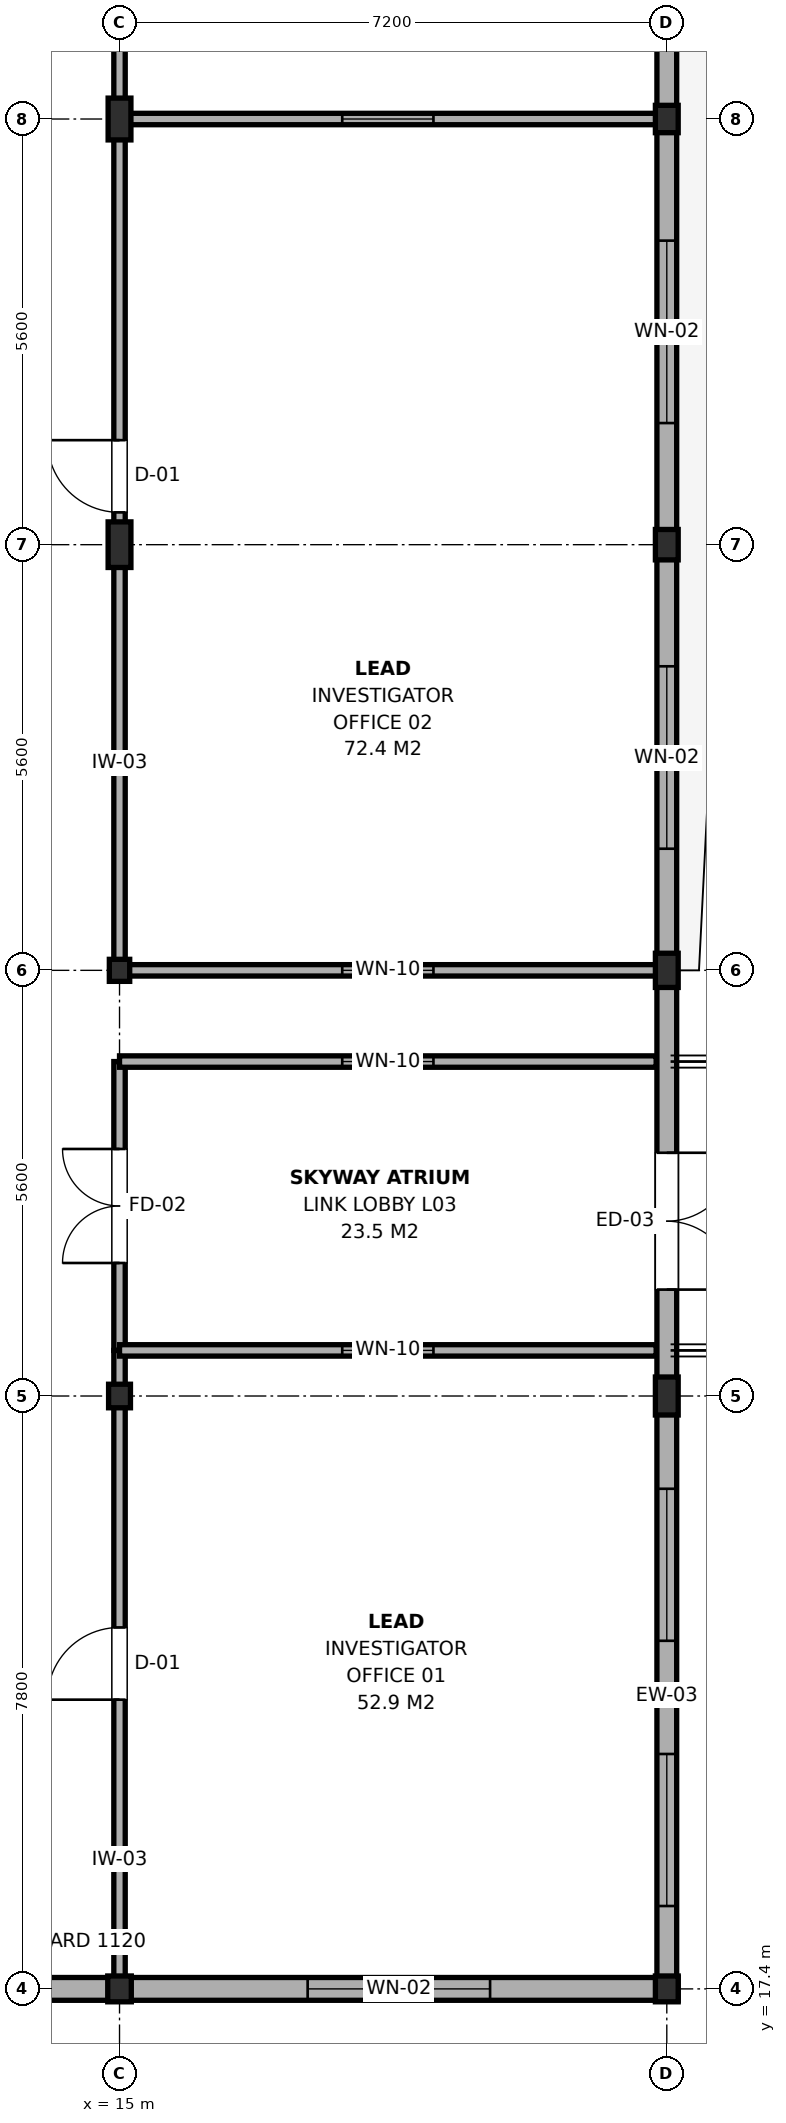
"""IFC4 building model, lengths in metres.
Left out: names, types, materials, properties, quantities, classifications, styles, units other than length and angle.
Written with IfcOpenShell. Run it as: python <this file> out.ifc"""

import sys

from ifc_helpers import new_model, si_unit, direction, frame, frame_2d, origin, origin_2d, place, context, subcontext, project, spatial, rectangle, i_section, extrude, element, fill, save


model = new_model("IFC4")
c1 = context("Model", 3, precision=1e-05, world=origin(), true_north=direction((0.0, 1.0)))
c2 = subcontext(c1, "Body", "Model", "MODEL_VIEW")
j1 = project(units=[si_unit("LENGTHUNIT", "METRE"), si_unit("PLANEANGLEUNIT", "RADIAN")], contexts=[c1])
p1 = place(None, origin())
s1 = spatial("IfcSite", under=j1, at=p1, CompositionType="ELEMENT")
p2 = place(p1, origin())
s2 = spatial("IfcBuilding", under=s1, at=p2, CompositionType="ELEMENT")
p3 = place(p2, frame((0.0, 0.0, 13.2)))
s3 = spatial("IfcBuildingStorey", under=s2, at=p3, CompositionType="ELEMENT", Elevation=13.2)
p4 = place(p3, frame((15.0, 17.4, 0.0), z_axis=(0.0, 0.0, 1.0), x_axis=(1.0, 0.0, 0.0)))
e1 = element("IfcColumn", 1, at=p4, inside=s3, PredefinedType="COLUMN", context=c2, shape_type="SweptSolid", body=[
    extrude(i_section(OverallWidth=0.31, OverallDepth=0.34, WebThickness=0.021, FlangeThickness=0.039, FilletRadius=0.027, at=origin_2d()), origin(), (0.0, 0.0, 1.0), 3.9),
])
p5 = place(p3, frame((15.0, 25.2, 0.0), z_axis=(0.0, 0.0, 1.0), x_axis=(1.0, 0.0, 0.0)))
e2 = element("IfcColumn", 2, at=p5, inside=s3, PredefinedType="COLUMN", context=c2, shape_type="SweptSolid", body=[
    extrude(i_section(OverallWidth=0.288, OverallDepth=0.31, WebThickness=0.019, FlangeThickness=0.033, FilletRadius=0.024, at=origin_2d()), origin(), (0.0, 0.0, 1.0), 3.9),
])
p6 = place(p3, frame((15.0, 30.8, 0.0), z_axis=(0.0, 0.0, 1.0), x_axis=(1.0, 0.0, 0.0)))
e3 = element("IfcColumn", 3, at=p6, inside=s3, PredefinedType="COLUMN", context=c2, shape_type="SweptSolid", body=[
    extrude(i_section(OverallWidth=0.268, OverallDepth=0.29, WebThickness=0.018, FlangeThickness=0.032, FilletRadius=0.024, at=origin_2d()), origin(), (0.0, 0.0, 1.0), 3.9),
])
p7 = place(p3, frame((15.0, 36.4, 0.0), z_axis=(0.0, 0.0, 1.0), x_axis=(1.0, 0.0, 0.0)))
e4 = element("IfcColumn", 4, at=p7, inside=s3, PredefinedType="COLUMN", context=c2, shape_type="SweptSolid", body=[
    extrude(i_section(OverallWidth=0.3, OverallDepth=0.6, WebThickness=0.015, FlangeThickness=0.03, FilletRadius=0.027, at=origin_2d()), origin(), (0.0, 0.0, 1.0), 3.9),
])
p8 = place(p3, frame((15.0, 42.0, 0.0), z_axis=(0.0, 0.0, 1.0), x_axis=(1.0, 0.0, 0.0)))
e5 = element("IfcColumn", 5, at=p8, inside=s3, PredefinedType="COLUMN", context=c2, shape_type="SweptSolid", body=[
    extrude(i_section(OverallWidth=0.3, OverallDepth=0.55, WebThickness=0.015, FlangeThickness=0.029, FilletRadius=0.027, at=origin_2d()), origin(), (0.0, 0.0, 1.0), 3.9),
])
p9 = place(p3, frame((22.2, 17.4, 0.0), z_axis=(0.0, 0.0, 1.0), x_axis=(1.0, 0.0, 0.0)))
e6 = element("IfcColumn", 6, at=p9, inside=s3, PredefinedType="COLUMN", context=c2, shape_type="SweptSolid", body=[
    extrude(i_section(OverallWidth=0.3, OverallDepth=0.34, WebThickness=0.012, FlangeThickness=0.021, FilletRadius=0.027, at=origin_2d()), origin(), (0.0, 0.0, 1.0), 3.9),
])
p10 = place(p3, frame((22.2, 25.2, 0.0), z_axis=(0.0, 0.0, 1.0), x_axis=(1.0, 0.0, 0.0)))
e7 = element("IfcColumn", 7, at=p10, inside=s3, PredefinedType="COLUMN", context=c2, shape_type="SweptSolid", body=[
    extrude(i_section(OverallWidth=0.3, OverallDepth=0.5, WebThickness=0.014, FlangeThickness=0.028, FilletRadius=0.027, at=origin_2d()), origin(), (0.0, 0.0, 1.0), 3.9),
])
p11 = place(p3, frame((22.2, 30.8, 0.0), z_axis=(0.0, 0.0, 1.0), x_axis=(1.0, 0.0, 0.0)))
e8 = element("IfcColumn", 8, at=p11, inside=s3, PredefinedType="COLUMN", context=c2, shape_type="SweptSolid", body=[
    extrude(i_section(OverallWidth=0.3, OverallDepth=0.45, WebThickness=0.014, FlangeThickness=0.026, FilletRadius=0.027, at=origin_2d()), origin(), (0.0, 0.0, 1.0), 3.9),
])
p12 = place(p3, frame((22.2, 36.4, 0.0), z_axis=(0.0, 0.0, 1.0), x_axis=(1.0, 0.0, 0.0)))
e9 = element("IfcColumn", 9, at=p12, inside=s3, PredefinedType="COLUMN", context=c2, shape_type="SweptSolid", body=[
    extrude(i_section(OverallWidth=0.3, OverallDepth=0.4, WebThickness=0.013, FlangeThickness=0.024, FilletRadius=0.027, at=origin_2d()), origin(), (0.0, 0.0, 1.0), 3.9),
])
p13 = place(p3, frame((22.2, 42.0, 0.0), z_axis=(0.0, 0.0, 1.0), x_axis=(1.0, 0.0, 0.0)))
e10 = element("IfcColumn", 10, at=p13, inside=s3, PredefinedType="COLUMN", context=c2, shape_type="SweptSolid", body=[
    extrude(i_section(OverallWidth=0.3, OverallDepth=0.36, WebThickness=0.012, FlangeThickness=0.022, FilletRadius=0.027, at=origin_2d()), origin(), (0.0, 0.0, 1.0), 3.9),
])
p14 = place(p3, frame((22.2, 17.27, 0.0), z_axis=(0.0, 0.0, 1.0), x_axis=(0.0, 1.0, 0.0)))
e11 = element("IfcWall", 11, at=p14, inside=s3, PredefinedType="SOLIDWALL", context=c2, shape_type="SweptSolid", body=[
    extrude(rectangle(XDim=7.93, YDim=0.26, at=frame_2d((3.965, 0.0))), origin(), (0.0, 0.0, 1.0), 3.145),
])
p15 = place(p14, frame((1.22, 0.0, 0.65)))
e12 = element("IfcOpeningElement", 12, at=p15, cuts=e11, PredefinedType="OPENING", context=c2, shape_type="SweptSolid", body=[
    extrude(rectangle(XDim=2.0, YDim=1.8, at=frame_2d((1.0, 0.9))), frame((0.0, 0.145, 0.0), z_axis=(0.0, -1.0, 0.0), x_axis=(1.0, 0.0, 0.0)), (0.0, 0.0, 1.0), 0.29),
])
p16 = place(p14, frame((4.71, 0.0, 0.65)))
e13 = element("IfcOpeningElement", 13, at=p16, cuts=e11, PredefinedType="OPENING", context=c2, shape_type="SweptSolid", body=[
    extrude(rectangle(XDim=2.0, YDim=1.8, at=frame_2d((1.0, 0.9))), frame((0.0, 0.145, 0.0), z_axis=(0.0, -1.0, 0.0), x_axis=(1.0, 0.0, 0.0)), (0.0, 0.0, 1.0), 0.29),
])
p17 = place(p3, frame((22.2, 25.2, 0.0), z_axis=(0.0, 0.0, 1.0), x_axis=(0.0, 1.0, 0.0)))
e14 = element("IfcWall", 14, at=p17, inside=s3, PredefinedType="SOLIDWALL", context=c2, shape_type="SweptSolid", body=[
    extrude(rectangle(XDim=5.6, YDim=0.26, at=frame_2d((2.8, 0.0))), origin(), (0.0, 0.0, 1.0), 3.145),
])
p18 = place(p17, frame((1.4, 0.0, 0.0)))
e15 = element("IfcOpeningElement", 15, at=p18, cuts=e14, PredefinedType="OPENING", context=c2, shape_type="SweptSolid", body=[
    extrude(rectangle(XDim=1.8, YDim=2.2, at=frame_2d((0.9, 1.1))), frame((0.0, 0.145, 0.0), z_axis=(0.0, -1.0, 0.0), x_axis=(1.0, 0.0, 0.0)), (0.0, 0.0, 1.0), 0.29),
])
p19 = place(p3, frame((22.2, 30.8, 0.0), z_axis=(0.0, 0.0, 1.0), x_axis=(0.0, 1.0, 0.0)))
e16 = element("IfcWall", 16, at=p19, inside=s3, PredefinedType="SOLIDWALL", context=c2, shape_type="SweptSolid", body=[
    extrude(rectangle(XDim=5.6, YDim=0.26, at=frame_2d((2.8, 0.0))), origin(), (0.0, 0.0, 1.0), 3.195),
])
p20 = place(p19, frame((1.6, 0.0, 0.9)))
e17 = element("IfcOpeningElement", 17, at=p20, cuts=e16, PredefinedType="OPENING", context=c2, shape_type="SweptSolid", body=[
    extrude(rectangle(XDim=2.4, YDim=2.1, at=frame_2d((1.2, 1.05))), frame((0.0, 0.145, 0.0), z_axis=(0.0, -1.0, 0.0), x_axis=(1.0, 0.0, 0.0)), (0.0, 0.0, 1.0), 0.29),
])
p21 = place(p3, frame((22.2, 36.4, 0.0), z_axis=(0.0, 0.0, 1.0), x_axis=(0.0, 1.0, 0.0)))
e18 = element("IfcWall", 18, at=p21, inside=s3, PredefinedType="SOLIDWALL", context=c2, shape_type="SweptSolid", body=[
    extrude(rectangle(XDim=5.6, YDim=0.26, at=frame_2d((2.8, 0.0))), origin(), (0.0, 0.0, 1.0), 3.245),
])
p22 = place(p21, frame((1.6, 0.0, 0.9)))
e19 = element("IfcOpeningElement", 19, at=p22, cuts=e18, PredefinedType="OPENING", context=c2, shape_type="SweptSolid", body=[
    extrude(rectangle(XDim=2.4, YDim=2.1, at=frame_2d((1.2, 1.05))), frame((0.0, 0.145, 0.0), z_axis=(0.0, -1.0, 0.0), x_axis=(1.0, 0.0, 0.0)), (0.0, 0.0, 1.0), 0.29),
])
p23 = place(p3, frame((22.2, 42.0, 0.0), z_axis=(0.0, 0.0, 1.0), x_axis=(0.0, 1.0, 0.0)))
e20 = element("IfcWall", 20, at=p23, inside=s3, PredefinedType="SOLIDWALL", context=c2, shape_type="SweptSolid", body=[
    extrude(rectangle(XDim=5.6, YDim=0.26, at=frame_2d((2.8, 0.0))), origin(), (0.0, 0.0, 1.0), 3.095),
])
p24 = place(p23, frame((1.9, 0.0, 0.65)))
e21 = element("IfcOpeningElement", 21, at=p24, cuts=e20, PredefinedType="OPENING", context=c2, shape_type="SweptSolid", body=[
    extrude(rectangle(XDim=1.8, YDim=1.2, at=frame_2d((0.9, 0.6))), frame((0.0, 0.145, 0.0), z_axis=(0.0, -1.0, 0.0), x_axis=(1.0, 0.0, 0.0)), (0.0, 0.0, 1.0), 0.29),
])
p25 = place(p3, frame((7.8, 17.4, 0.0), z_axis=(0.0, 0.0, 1.0), x_axis=(1.0, 0.0, 0.0)))
e22 = element("IfcWall", 22, at=p25, inside=s3, PredefinedType="SOLIDWALL", context=c2, shape_type="SweptSolid", body=[
    extrude(rectangle(XDim=7.2, YDim=0.3, at=frame_2d((3.6, 0.0))), origin(), (0.0, 0.0, 1.0), 3.245),
])
p26 = place(p25, frame((1.45, 0.0, 0.9)))
e23 = element("IfcOpeningElement", 23, at=p26, cuts=e22, PredefinedType="OPENING", context=c2, shape_type="SweptSolid", body=[
    extrude(rectangle(XDim=2.4, YDim=2.1, at=frame_2d((1.2, 1.05))), frame((0.0, 0.165, 0.0), z_axis=(0.0, -1.0, 0.0), x_axis=(1.0, 0.0, 0.0)), (0.0, 0.0, 1.0), 0.33),
])
p27 = place(p3, frame((15.0, 17.4, 0.0), z_axis=(0.0, 0.0, 1.0), x_axis=(1.0, 0.0, 0.0)))
e24 = element("IfcWall", 24, at=p27, inside=s3, PredefinedType="SOLIDWALL", context=c2, shape_type="SweptSolid", body=[
    extrude(rectangle(XDim=7.35, YDim=0.3, at=frame_2d((3.675, 0.0))), origin(), (0.0, 0.0, 1.0), 3.345),
])
p28 = place(p27, frame((2.475, 0.0, 0.9)))
e25 = element("IfcOpeningElement", 25, at=p28, cuts=e24, PredefinedType="OPENING", context=c2, shape_type="SweptSolid", body=[
    extrude(rectangle(XDim=2.4, YDim=2.1, at=frame_2d((1.2, 1.05))), frame((0.0, 0.165, 0.0), z_axis=(0.0, -1.0, 0.0), x_axis=(1.0, 0.0, 0.0)), (0.0, 0.0, 1.0), 0.33),
])
p29 = place(p3, frame((15.0, 17.56, 0.0), z_axis=(0.0, 0.0, 1.0), x_axis=(0.0, 1.0, 0.0)))
e26 = element("IfcWall", 26, at=p29, inside=s3, PredefinedType="PARTITIONING", context=c2, shape_type="SweptSolid", body=[
    extrude(rectangle(XDim=8.24, YDim=0.15, at=frame_2d((4.12, 0.0))), origin(), (0.0, 0.0, 1.0), 3.145),
])
p30 = place(p29, frame((3.645, 0.0, 0.0)))
e27 = element("IfcOpeningElement", 27, at=p30, cuts=e26, PredefinedType="OPENING", context=c2, shape_type="SweptSolid", body=[
    extrude(rectangle(XDim=0.95, YDim=2.15, at=frame_2d((0.475, 1.075))), frame((0.0, 0.09, 0.0), z_axis=(0.0, -1.0, 0.0), x_axis=(1.0, 0.0, 0.0)), (0.0, 0.0, 1.0), 0.18),
])
p31 = place(p3, frame((15.0, 25.8, 0.0), z_axis=(0.0, 0.0, 1.0), x_axis=(0.0, 1.0, 0.0)))
e28 = element("IfcWall", 28, at=p31, inside=s3, PredefinedType="PARTITIONING", context=c2, shape_type="SweptSolid", body=[
    extrude(rectangle(XDim=3.8, YDim=0.15, at=frame_2d((1.9, 0.0))), origin(), (0.0, 0.0, 1.0), 3.345),
])
p32 = place(p31, frame((1.15, 0.0, 0.0)))
e29 = element("IfcOpeningElement", 29, at=p32, cuts=e28, PredefinedType="OPENING", context=c2, shape_type="SweptSolid", body=[
    extrude(rectangle(XDim=1.5, YDim=2.15, at=frame_2d((0.75, 1.075))), frame((0.0, 0.09, 0.0), z_axis=(0.0, -1.0, 0.0), x_axis=(1.0, 0.0, 0.0)), (0.0, 0.0, 1.0), 0.18),
])
p33 = place(p3, frame((15.0, 25.8, 0.0), z_axis=(0.0, 0.0, 1.0), x_axis=(1.0, 0.0, 0.0)))
e30 = element("IfcWall", 30, at=p33, inside=s3, PredefinedType="PARTITIONING", context=c2, shape_type="SweptSolid", body=[
    extrude(rectangle(XDim=7.06, YDim=0.15, at=frame_2d((3.53, 0.0))), origin(), (0.0, 0.0, 1.0), 3.195),
])
p34 = place(p33, frame((2.93, 0.0, 0.95)))
e31 = element("IfcOpeningElement", 31, at=p34, cuts=e30, PredefinedType="OPENING", context=c2, shape_type="SweptSolid", body=[
    extrude(rectangle(XDim=1.2, YDim=1.5, at=frame_2d((0.6, 0.75))), frame((0.0, 0.09, 0.0), z_axis=(0.0, -1.0, 0.0), x_axis=(1.0, 0.0, 0.0)), (0.0, 0.0, 1.0), 0.18),
])
p35 = place(p3, frame((15.0, 29.6, 0.0), z_axis=(0.0, 0.0, 1.0), x_axis=(1.0, 0.0, 0.0)))
e32 = element("IfcWall", 32, at=p35, inside=s3, PredefinedType="PARTITIONING", context=c2, shape_type="SweptSolid", body=[
    extrude(rectangle(XDim=7.06, YDim=0.15, at=frame_2d((3.53, 0.0))), origin(), (0.0, 0.0, 1.0), 3.195),
])
p36 = place(p35, frame((2.93, 0.0, 0.95)))
e33 = element("IfcOpeningElement", 33, at=p36, cuts=e32, PredefinedType="OPENING", context=c2, shape_type="SweptSolid", body=[
    extrude(rectangle(XDim=1.2, YDim=1.5, at=frame_2d((0.6, 0.75))), frame((0.0, 0.09, 0.0), z_axis=(0.0, -1.0, 0.0), x_axis=(1.0, 0.0, 0.0)), (0.0, 0.0, 1.0), 0.18),
])
p37 = place(p3, frame((15.0, 30.8, 0.0), z_axis=(0.0, 0.0, 1.0), x_axis=(0.0, 1.0, 0.0)))
e34 = element("IfcWall", 34, at=p37, inside=s3, PredefinedType="PARTITIONING", context=c2, shape_type="SweptSolid", body=[
    extrude(rectangle(XDim=11.2, YDim=0.15, at=frame_2d((5.6, 0.0))), origin(), (0.0, 0.0, 1.0), 3.095),
])
p38 = place(p37, frame((6.025, 0.0, 0.0)))
e35 = element("IfcOpeningElement", 35, at=p38, cuts=e34, PredefinedType="OPENING", context=c2, shape_type="SweptSolid", body=[
    extrude(rectangle(XDim=0.95, YDim=2.15, at=frame_2d((0.475, 1.075))), frame((0.0, 0.09, 0.0), z_axis=(0.0, -1.0, 0.0), x_axis=(1.0, 0.0, 0.0)), (0.0, 0.0, 1.0), 0.18),
])
p39 = place(p3, frame((15.0, 30.8, 0.0), z_axis=(0.0, 0.0, 1.0), x_axis=(1.0, 0.0, 0.0)))
e36 = element("IfcWall", 36, at=p39, inside=s3, PredefinedType="PARTITIONING", context=c2, shape_type="SweptSolid", body=[
    extrude(rectangle(XDim=7.06, YDim=0.15, at=frame_2d((3.53, 0.0))), origin(), (0.0, 0.0, 1.0), 3.195),
])
p40 = place(p39, frame((2.93, 0.0, 0.95)))
e37 = element("IfcOpeningElement", 37, at=p40, cuts=e36, PredefinedType="OPENING", context=c2, shape_type="SweptSolid", body=[
    extrude(rectangle(XDim=1.2, YDim=1.5, at=frame_2d((0.6, 0.75))), frame((0.0, 0.09, 0.0), z_axis=(0.0, -1.0, 0.0), x_axis=(1.0, 0.0, 0.0)), (0.0, 0.0, 1.0), 0.18),
])
p41 = place(p3, frame((15.0, 42.0, 0.0), z_axis=(0.0, 0.0, 1.0), x_axis=(0.0, 1.0, 0.0)))
e38 = element("IfcWall", 38, at=p41, inside=s3, PredefinedType="PARTITIONING", context=c2, shape_type="SweptSolid", body=[
    extrude(rectangle(XDim=24.6, YDim=0.15, at=frame_2d((12.3, 0.0))), origin(), (0.0, 0.0, 1.0), 3.095),
])
p42 = place(p41, frame((11.5, 0.0, 0.0)))
e39 = element("IfcOpeningElement", 39, at=p42, cuts=e38, PredefinedType="OPENING", context=c2, shape_type="SweptSolid", body=[
    extrude(rectangle(XDim=1.6, YDim=2.15, at=frame_2d((0.8, 1.075))), frame((0.0, 0.09, 0.0), z_axis=(0.0, -1.0, 0.0), x_axis=(1.0, 0.0, 0.0)), (0.0, 0.0, 1.0), 0.18),
])
p43 = place(p3, frame((15.0, 42.0, 0.0), z_axis=(0.0, 0.0, 1.0), x_axis=(1.0, 0.0, 0.0)))
e40 = element("IfcWall", 40, at=p43, inside=s3, PredefinedType="PARTITIONING", context=c2, shape_type="SweptSolid", body=[
    extrude(rectangle(XDim=7.06, YDim=0.15, at=frame_2d((3.53, 0.0))), origin(), (0.0, 0.0, 1.0), 3.195),
])
p44 = place(p43, frame((2.93, 0.0, 0.95)))
e41 = element("IfcOpeningElement", 41, at=p44, cuts=e40, PredefinedType="OPENING", context=c2, shape_type="SweptSolid", body=[
    extrude(rectangle(XDim=1.2, YDim=1.5, at=frame_2d((0.6, 0.75))), frame((0.0, 0.09, 0.0), z_axis=(0.0, -1.0, 0.0), x_axis=(1.0, 0.0, 0.0)), (0.0, 0.0, 1.0), 0.18),
])
p45 = place(p15, origin())
e42 = element("IfcWindow", 42, at=p45, inside=s3, PartitioningType="SINGLE_PANEL", PredefinedType="WINDOW", context=c2, shape_type="SweptSolid", body=[
    extrude(rectangle(XDim=2.0, YDim=1.8, at=frame_2d((1.0, 0.9))), frame((0.0, 0.03, 0.0), z_axis=(0.0, -1.0, 0.0), x_axis=(1.0, 0.0, 0.0)), (0.0, 0.0, 1.0), 0.06),
])
fill(e12, e42)
p46 = place(p16, origin())
e43 = element("IfcWindow", 43, at=p46, inside=s3, PartitioningType="SINGLE_PANEL", PredefinedType="WINDOW", context=c2, shape_type="SweptSolid", body=[
    extrude(rectangle(XDim=2.0, YDim=1.8, at=frame_2d((1.0, 0.9))), frame((0.0, 0.03, 0.0), z_axis=(0.0, -1.0, 0.0), x_axis=(1.0, 0.0, 0.0)), (0.0, 0.0, 1.0), 0.06),
])
fill(e13, e43)
p47 = place(p18, frame((1.8, 0.0, 0.0), z_axis=(0.0, 0.0, 1.0), x_axis=(-1.0, 0.0, 0.0)))
e44 = element("IfcDoor", 44, at=p47, inside=s3, OperationType="DOUBLE_DOOR_SINGLE_SWING", PredefinedType="DOOR", context=c2, shape_type="SweptSolid", body=[
    extrude(rectangle(XDim=1.8, YDim=2.2, at=frame_2d((0.9, 1.1))), frame((0.0, 0.025, 0.0), z_axis=(0.0, -1.0, 0.0), x_axis=(1.0, 0.0, 0.0)), (0.0, 0.0, 1.0), 0.05),
])
fill(e15, e44)
p48 = place(p20, origin())
e45 = element("IfcWindow", 45, at=p48, inside=s3, PartitioningType="SINGLE_PANEL", PredefinedType="WINDOW", context=c2, shape_type="SweptSolid", body=[
    extrude(rectangle(XDim=2.4, YDim=2.1, at=frame_2d((1.2, 1.05))), frame((0.0, 0.03, 0.0), z_axis=(0.0, -1.0, 0.0), x_axis=(1.0, 0.0, 0.0)), (0.0, 0.0, 1.0), 0.06),
])
fill(e17, e45)
p49 = place(p22, origin())
e46 = element("IfcWindow", 46, at=p49, inside=s3, PartitioningType="SINGLE_PANEL", PredefinedType="WINDOW", context=c2, shape_type="SweptSolid", body=[
    extrude(rectangle(XDim=2.4, YDim=2.1, at=frame_2d((1.2, 1.05))), frame((0.0, 0.03, 0.0), z_axis=(0.0, -1.0, 0.0), x_axis=(1.0, 0.0, 0.0)), (0.0, 0.0, 1.0), 0.06),
])
fill(e19, e46)
p50 = place(p28, origin())
e47 = element("IfcWindow", 47, at=p50, inside=s3, PartitioningType="SINGLE_PANEL", PredefinedType="WINDOW", context=c2, shape_type="SweptSolid", body=[
    extrude(rectangle(XDim=2.4, YDim=2.1, at=frame_2d((1.2, 1.05))), frame((0.0, 0.03, 0.0), z_axis=(0.0, -1.0, 0.0), x_axis=(1.0, 0.0, 0.0)), (0.0, 0.0, 1.0), 0.06),
])
fill(e25, e47)
p51 = place(p30, origin())
e48 = element("IfcDoor", 48, at=p51, inside=s3, OperationType="SINGLE_SWING_LEFT", PredefinedType="DOOR", context=c2, shape_type="SweptSolid", body=[
    extrude(rectangle(XDim=0.95, YDim=2.15, at=frame_2d((0.475, 1.075))), frame((0.0, 0.025, 0.0), z_axis=(0.0, -1.0, 0.0), x_axis=(1.0, 0.0, 0.0)), (0.0, 0.0, 1.0), 0.05),
])
fill(e27, e48)
p52 = place(p32, origin())
e49 = element("IfcDoor", 49, at=p52, inside=s3, OperationType="DOUBLE_DOOR_SINGLE_SWING", PredefinedType="DOOR", context=c2, shape_type="SweptSolid", body=[
    extrude(rectangle(XDim=1.5, YDim=2.15, at=frame_2d((0.75, 1.075))), frame((0.0, 0.025, 0.0), z_axis=(0.0, -1.0, 0.0), x_axis=(1.0, 0.0, 0.0)), (0.0, 0.0, 1.0), 0.05),
])
fill(e29, e49)
p53 = place(p34, origin())
e50 = element("IfcWindow", 50, at=p53, inside=s3, PartitioningType="SINGLE_PANEL", PredefinedType="WINDOW", context=c2, shape_type="SweptSolid", body=[
    extrude(rectangle(XDim=1.2, YDim=1.5, at=frame_2d((0.6, 0.75))), frame((0.0, 0.03, 0.0), z_axis=(0.0, -1.0, 0.0), x_axis=(1.0, 0.0, 0.0)), (0.0, 0.0, 1.0), 0.06),
])
fill(e31, e50)
p54 = place(p36, origin())
e51 = element("IfcWindow", 51, at=p54, inside=s3, PartitioningType="SINGLE_PANEL", PredefinedType="WINDOW", context=c2, shape_type="SweptSolid", body=[
    extrude(rectangle(XDim=1.2, YDim=1.5, at=frame_2d((0.6, 0.75))), frame((0.0, 0.03, 0.0), z_axis=(0.0, -1.0, 0.0), x_axis=(1.0, 0.0, 0.0)), (0.0, 0.0, 1.0), 0.06),
])
fill(e33, e51)
p55 = place(p38, origin())
e52 = element("IfcDoor", 52, at=p55, inside=s3, OperationType="SINGLE_SWING_RIGHT", PredefinedType="DOOR", context=c2, shape_type="SweptSolid", body=[
    extrude(rectangle(XDim=0.95, YDim=2.15, at=frame_2d((0.475, 1.075))), frame((0.0, 0.025, 0.0), z_axis=(0.0, -1.0, 0.0), x_axis=(1.0, 0.0, 0.0)), (0.0, 0.0, 1.0), 0.05),
])
fill(e35, e52)
p56 = place(p40, origin())
e53 = element("IfcWindow", 53, at=p56, inside=s3, PartitioningType="SINGLE_PANEL", PredefinedType="WINDOW", context=c2, shape_type="SweptSolid", body=[
    extrude(rectangle(XDim=1.2, YDim=1.5, at=frame_2d((0.6, 0.75))), frame((0.0, 0.03, 0.0), z_axis=(0.0, -1.0, 0.0), x_axis=(1.0, 0.0, 0.0)), (0.0, 0.0, 1.0), 0.06),
])
fill(e37, e53)
p57 = place(p44, origin())
e54 = element("IfcWindow", 54, at=p57, inside=s3, PartitioningType="SINGLE_PANEL", PredefinedType="WINDOW", context=c2, shape_type="SweptSolid", body=[
    extrude(rectangle(XDim=1.2, YDim=1.5, at=frame_2d((0.6, 0.75))), frame((0.0, 0.03, 0.0), z_axis=(0.0, -1.0, 0.0), x_axis=(1.0, 0.0, 0.0)), (0.0, 0.0, 1.0), 0.06),
])
fill(e41, e54)
save(model, sys.argv[1])
